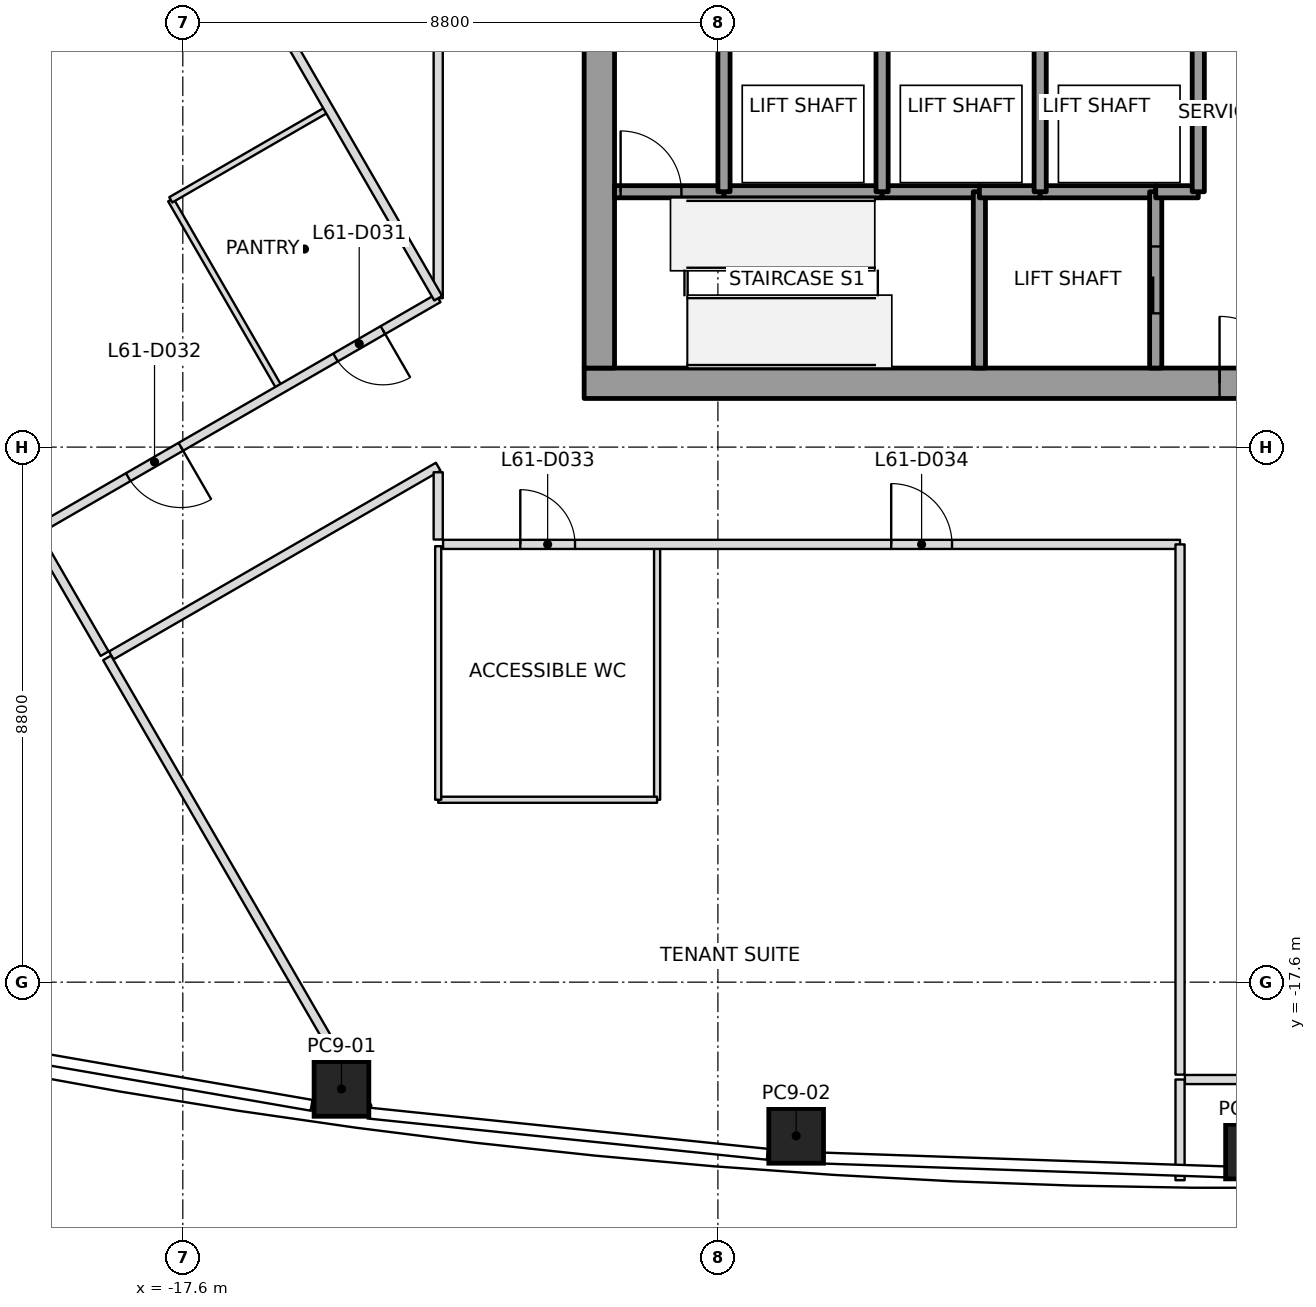
"""IFC4 building model, lengths in metres.
Left out: names, types, materials, properties, quantities, classifications, styles, units other than length and angle.
Written with IfcOpenShell. Run it as: python <this file> out.ifc"""

import sys

from ifc_helpers import new_model, si_unit, direction, frame, frame_2d, origin, origin_2d, place, context, subcontext, project, spatial, rectangle, extrude, element, fill, save


model = new_model("IFC4")
c1 = context("Model", 3, precision=1e-05, world=origin(), true_north=direction((0.0, 1.0)))
c2 = subcontext(c1, "Body", "Model", "MODEL_VIEW")
j1 = project(units=[si_unit("LENGTHUNIT", "METRE"), si_unit("PLANEANGLEUNIT", "RADIAN")], contexts=[c1])
p1 = place(None, origin())
s1 = spatial("IfcSite", under=j1, at=p1, CompositionType="ELEMENT")
p2 = place(p1, origin())
s2 = spatial("IfcBuilding", under=s1, at=p2, CompositionType="ELEMENT")
p3 = place(p2, frame((0.0, 0.0, 271.0)))
s3 = spatial("IfcBuildingStorey", under=s2, at=p3, CompositionType="ELEMENT", Elevation=271.0)
p4 = place(p3, frame((-14.991, -19.356, 0.0), z_axis=(0.017452445502, 0.010434853779, 0.999793241612), x_axis=(-0.990449528145, 0.136960564895, 0.015859882108)))
e1 = element("IfcColumn", 1, at=p4, inside=s3, PredefinedType="COLUMN", context=c2, shape_type="SweptSolid", body=[
    extrude(rectangle(XDim=0.9, YDim=0.9, at=origin_2d()), origin(), (0.0, 0.0, 1.0), 4.001),
])
p5 = place(p3, frame((-7.513, -20.128, 0.0), z_axis=(0.008727150594, 0.011168311599, 0.999899547784), x_axis=(-0.997609340285, 0.068648045821, 0.007940401811)))
e2 = element("IfcColumn", 2, at=p5, inside=s3, PredefinedType="COLUMN", context=c2, shape_type="SweptSolid", body=[
    extrude(rectangle(XDim=0.9, YDim=0.9, at=origin_2d()), origin(), (0.0, 0.0, 1.0), 4.0),
])
p6 = place(p3, frame((0.0, -20.386, 0.0), z_axis=(0.0, 0.01141283087, 0.999934871525), x_axis=(1.0, 0.0, 0.0)))
e3 = element("IfcColumn", 3, at=p6, inside=s3, PredefinedType="COLUMN", context=c2, shape_type="SweptSolid", body=[
    extrude(rectangle(XDim=0.9, YDim=0.9, at=origin_2d()), origin(), (0.0, 0.0, 1.0), 4.0),
])
p7 = place(p3, frame((-11.0, -7.75, 0.0), z_axis=(0.0, 0.0, 1.0), x_axis=(1.0, 0.0, 0.0)))
e4 = element("IfcWall", 4, at=p7, inside=s3, PredefinedType="SHEAR", context=c2, shape_type="SweptSolid", body=[
    extrude(rectangle(XDim=22.0, YDim=0.5, at=frame_2d((11.0, 0.0))), origin(), (0.0, 0.0, 1.0), 4.0),
])
p8 = place(p7, frame((10.45, 0.0, 0.0)))
e5 = element("IfcOpeningElement", 5, at=p8, cuts=e4, PredefinedType="OPENING", context=c2, shape_type="SweptSolid", body=[
    extrude(rectangle(XDim=1.1, YDim=2.1, at=frame_2d((0.55, 1.05))), frame((0.0, 0.25, 0.0), z_axis=(0.0, -1.0, 0.0), x_axis=(1.0, 0.0, 0.0)), (0.0, 0.0, 1.0), 0.5),
])
p9 = place(p3, frame((-10.75, -7.5, 0.0), z_axis=(0.0, 0.0, 1.0), x_axis=(0.0, 1.0, 0.0)))
e6 = element("IfcWall", 6, at=p9, inside=s3, PredefinedType="SHEAR", context=c2, shape_type="SweptSolid", body=[
    extrude(rectangle(XDim=15.0, YDim=0.5, at=frame_2d((7.5, 0.0))), origin(), (0.0, 0.0, 1.0), 4.0),
])
p10 = place(p9, frame((6.6, 0.0, 0.0)))
e7 = element("IfcOpeningElement", 7, at=p10, cuts=e6, PredefinedType="OPENING", context=c2, shape_type="SweptSolid", body=[
    extrude(rectangle(XDim=1.8, YDim=2.1, at=frame_2d((0.9, 1.05))), frame((0.0, 0.25, 0.0), z_axis=(0.0, -1.0, 0.0), x_axis=(1.0, 0.0, 0.0)), (0.0, 0.0, 1.0), 0.5),
])
p11 = place(p3, frame((-10.5, -4.6, 0.0), z_axis=(0.0, 0.0, 1.0), x_axis=(1.0, 0.0, 0.0)))
e8 = element("IfcWall", 8, at=p11, inside=s3, PredefinedType="SOLIDWALL", context=c2, shape_type="SweptSolid", body=[
    extrude(rectangle(XDim=1.8, YDim=0.2, at=frame_2d((0.9, 0.0))), origin(), (0.0, 0.0, 1.0), 3.85),
])
p12 = place(p11, frame((0.1, 0.0, 0.0)))
e9 = element("IfcOpeningElement", 9, at=p12, cuts=e8, PredefinedType="OPENING", context=c2, shape_type="SweptSolid", body=[
    extrude(rectangle(XDim=1.0, YDim=2.1, at=frame_2d((0.5, 1.05))), frame((0.0, 0.1, 0.0), z_axis=(0.0, -1.0, 0.0), x_axis=(1.0, 0.0, 0.0)), (0.0, 0.0, 1.0), 0.2),
])
p13 = place(p3, frame((-8.7, -4.6, 0.0), z_axis=(0.0, 0.0, 1.0), x_axis=(1.0, 0.0, 0.0)))
e10 = element("IfcWall", 10, at=p13, inside=s3, PredefinedType="SOLIDWALL", context=c2, shape_type="SweptSolid", body=[
    extrude(rectangle(XDim=2.6, YDim=0.2, at=frame_2d((1.3, 0.0))), origin(), (0.0, 0.0, 1.0), 3.85),
])
p14 = place(p3, frame((-8.7, -4.6, 0.0), z_axis=(0.0, 0.0, 1.0), x_axis=(0.0, 1.0, 0.0)))
e11 = element("IfcWall", 11, at=p14, inside=s3, PredefinedType="SOLIDWALL", context=c2, shape_type="SweptSolid", body=[
    extrude(rectangle(XDim=2.8, YDim=0.2, at=frame_2d((1.4, 0.0))), origin(), (0.0, 0.0, 1.0), 3.85),
])
p15 = place(p3, frame((-6.1, -4.6, 0.0), z_axis=(0.0, 0.0, 1.0), x_axis=(1.0, 0.0, 0.0)))
e12 = element("IfcWall", 12, at=p15, inside=s3, PredefinedType="SOLIDWALL", context=c2, shape_type="SweptSolid", body=[
    extrude(rectangle(XDim=1.6, YDim=0.2, at=frame_2d((0.8, 0.0))), origin(), (0.0, 0.0, 1.0), 3.85),
])
p16 = place(p3, frame((-6.1, -4.6, 0.0), z_axis=(0.0, 0.0, 1.0), x_axis=(0.0, 1.0, 0.0)))
e13 = element("IfcWall", 13, at=p16, inside=s3, PredefinedType="SOLIDWALL", context=c2, shape_type="SweptSolid", body=[
    extrude(rectangle(XDim=2.8, YDim=0.2, at=frame_2d((1.4, 0.0))), origin(), (0.0, 0.0, 1.0), 3.85),
])
p17 = place(p3, frame((-4.5, -4.6, 0.0), z_axis=(0.0, 0.0, 1.0), x_axis=(0.0, -1.0, 0.0)))
e14 = element("IfcWall", 14, at=p17, inside=s3, PredefinedType="SOLIDWALL", context=c2, shape_type="SweptSolid", body=[
    extrude(rectangle(XDim=2.9, YDim=0.2, at=frame_2d((1.45, 0.0))), origin(), (0.0, 0.0, 1.0), 3.85),
])
p18 = place(p3, frame((-4.5, -4.6, 0.0), z_axis=(0.0, 0.0, 1.0), x_axis=(1.0, 0.0, 0.0)))
e15 = element("IfcWall", 15, at=p18, inside=s3, PredefinedType="SOLIDWALL", context=c2, shape_type="SweptSolid", body=[
    extrude(rectangle(XDim=1.0, YDim=0.2, at=frame_2d((0.5, 0.0))), origin(), (0.0, 0.0, 1.0), 3.85),
])
p19 = place(p3, frame((-3.5, -4.6, 0.0), z_axis=(0.0, 0.0, 1.0), x_axis=(1.0, 0.0, 0.0)))
e16 = element("IfcWall", 16, at=p19, inside=s3, PredefinedType="SOLIDWALL", context=c2, shape_type="SweptSolid", body=[
    extrude(rectangle(XDim=1.9, YDim=0.2, at=frame_2d((0.95, 0.0))), origin(), (0.0, 0.0, 1.0), 3.85),
])
p20 = place(p3, frame((-3.5, -4.6, 0.0), z_axis=(0.0, 0.0, 1.0), x_axis=(0.0, 1.0, 0.0)))
e17 = element("IfcWall", 17, at=p20, inside=s3, PredefinedType="SOLIDWALL", context=c2, shape_type="SweptSolid", body=[
    extrude(rectangle(XDim=2.8, YDim=0.2, at=frame_2d((1.4, 0.0))), origin(), (0.0, 0.0, 1.0), 3.85),
])
p21 = place(p3, frame((-1.6, -7.5, 0.0), z_axis=(0.0, 0.0, 1.0), x_axis=(0.0, 1.0, 0.0)))
e18 = element("IfcWall", 18, at=p21, inside=s3, PredefinedType="SOLIDWALL", context=c2, shape_type="SweptSolid", body=[
    extrude(rectangle(XDim=2.9, YDim=0.2, at=frame_2d((1.45, 0.0))), origin(), (0.0, 0.0, 1.0), 3.85),
])
p22 = place(p21, frame((0.9, 0.0, 0.0)))
e19 = element("IfcOpeningElement", 19, at=p22, cuts=e18, PredefinedType="OPENING", context=c2, shape_type="SweptSolid", body=[
    extrude(rectangle(XDim=1.1, YDim=2.1, at=frame_2d((0.55, 1.05))), frame((0.0, 0.1, 0.0), z_axis=(0.0, -1.0, 0.0), x_axis=(1.0, 0.0, 0.0)), (0.0, 0.0, 1.0), 0.2),
])
p23 = place(p3, frame((-1.6, -4.6, 0.0), z_axis=(0.0, 0.0, 1.0), x_axis=(1.0, 0.0, 0.0)))
e20 = element("IfcWall", 20, at=p23, inside=s3, PredefinedType="SOLIDWALL", context=c2, shape_type="SweptSolid", body=[
    extrude(rectangle(XDim=0.7, YDim=0.2, at=frame_2d((0.35, 0.0))), origin(), (0.0, 0.0, 1.0), 3.85),
])
p24 = place(p3, frame((-0.9, -4.6, 0.0), z_axis=(0.0, 0.0, 1.0), x_axis=(0.0, 1.0, 0.0)))
e21 = element("IfcWall", 21, at=p24, inside=s3, PredefinedType="SOLIDWALL", context=c2, shape_type="SweptSolid", body=[
    extrude(rectangle(XDim=2.8, YDim=0.2, at=frame_2d((1.4, 0.0))), origin(), (0.0, 0.0, 1.0), 3.85),
])
p25 = place(p3, frame((-13.4, -6.351, 0.0), z_axis=(0.0, 0.0, 1.0), x_axis=(-0.500014181681, 0.866017215832, 0.0)))
e22 = element("IfcWall", 22, at=p25, inside=s3, PredefinedType="PARTITIONING", context=c2, shape_type="SweptSolid", body=[
    extrude(rectangle(XDim=14.223, YDim=0.15, at=frame_2d((7.111, 0.0))), origin(), (0.0, 0.0, 1.0), 3.234),
])
p26 = place(p3, frame((-18.846, -12.266, 0.0), z_axis=(0.0, 0.0, 1.0), x_axis=(0.500745947158, -0.865594302433, 0.0)))
e23 = element("IfcWall", 23, at=p26, inside=s3, PredefinedType="PARTITIONING", context=c2, shape_type="SweptSolid", body=[
    extrude(rectangle(XDim=8.553, YDim=0.15, at=frame_2d((4.277, 0.0))), origin(), (0.0, 0.0, 1.0), 3.3),
])
p27 = place(p3, frame((-1.2, -19.201, 0.0), z_axis=(0.0, 0.0, 1.0), x_axis=(0.0, -1.0, 0.0)))
e24 = element("IfcWall", 24, at=p27, inside=s3, PredefinedType="PARTITIONING", context=c2, shape_type="SweptSolid", body=[
    extrude(rectangle(XDim=1.656, YDim=0.15, at=frame_2d((0.828, 0.0))), origin(), (0.0, 0.0, 1.0), 3.234),
])
p28 = place(p3, frame((-20.006, -10.257, 0.0), z_axis=(0.0, 0.0, 1.0), x_axis=(0.500030632641, -0.866007717299, 0.0)))
e25 = element("IfcWall", 25, at=p28, inside=s3, PredefinedType="PARTITIONING", context=c2, shape_type="SweptSolid", body=[
    extrude(rectangle(XDim=2.24, YDim=0.15, at=frame_2d((1.12, 0.0))), origin(), (0.0, 0.0, 1.0), 3.233),
])
p29 = place(p3, frame((-13.4, -6.351, 0.0), z_axis=(0.0, 0.0, 1.0), x_axis=(-0.866034613097, -0.499984048663, 0.0)))
e26 = element("IfcWall", 26, at=p29, inside=s3, PredefinedType="PARTITIONING", context=c2, shape_type="SweptSolid", body=[
    extrude(rectangle(XDim=7.594, YDim=0.15, at=frame_2d((3.797, 0.0))), origin(), (0.0, 0.0, 1.0), 3.3),
])
p30 = place(p29, frame((1.05, 0.0, 0.0)))
e27 = element("IfcOpeningElement", 27, at=p30, cuts=e26, PredefinedType="OPENING", context=c2, shape_type="SweptSolid", body=[
    extrude(rectangle(XDim=0.9, YDim=2.1, at=frame_2d((0.45, 1.05))), frame((0.0, 0.075, 0.0), z_axis=(0.0, -1.0, 0.0), x_axis=(1.0, 0.0, 0.0)), (0.0, 0.0, 1.0), 0.15),
])
p31 = place(p29, frame((4.887, 0.0, 0.0)))
e28 = element("IfcOpeningElement", 28, at=p31, cuts=e26, PredefinedType="OPENING", context=c2, shape_type="SweptSolid", body=[
    extrude(rectangle(XDim=1.0, YDim=2.1, at=frame_2d((0.5, 1.05))), frame((0.0, 0.075, 0.0), z_axis=(0.0, -1.0, 0.0), x_axis=(1.0, 0.0, 0.0)), (0.0, 0.0, 1.0), 0.15),
])
p32 = place(p3, frame((-18.777, -12.226, 0.0), z_axis=(0.0, 0.0, 1.0), x_axis=(0.866025148001, 0.500000443029, 0.0)))
e29 = element("IfcWall", 29, at=p32, inside=s3, PredefinedType="PARTITIONING", context=c2, shape_type="SweptSolid", body=[
    extrude(rectangle(XDim=6.208, YDim=0.15, at=frame_2d((3.104, 0.0))), origin(), (0.0, 0.0, 1.0), 3.233),
])
p33 = place(p3, frame((-13.4, -9.214, 0.0), z_axis=(0.0, 0.0, 1.0), x_axis=(0.0, -1.0, 0.0)))
e30 = element("IfcWall", 30, at=p33, inside=s3, PredefinedType="PARTITIONING", context=c2, shape_type="SweptSolid", body=[
    extrude(rectangle(XDim=1.106, YDim=0.15, at=frame_2d((0.553, 0.0))), origin(), (0.0, 0.0, 1.0), 3.233),
])
p34 = place(p3, frame((-13.4, 6.351, 0.0), z_axis=(0.0, 0.0, 1.0), x_axis=(0.0, -1.0, 0.0)))
e31 = element("IfcWall", 31, at=p34, inside=s3, PredefinedType="PARTITIONING", context=c2, shape_type="SweptSolid", body=[
    extrude(rectangle(XDim=12.702, YDim=0.15, at=frame_2d((6.351, 0.0))), origin(), (0.0, 0.0, 1.0), 3.3),
])
p35 = place(p34, frame((5.851, 0.0, 0.0)))
e32 = element("IfcOpeningElement", 32, at=p35, cuts=e31, PredefinedType="OPENING", context=c2, shape_type="SweptSolid", body=[
    extrude(rectangle(XDim=1.0, YDim=2.1, at=frame_2d((0.5, 1.05))), frame((0.0, 0.075, 0.0), z_axis=(0.0, -1.0, 0.0), x_axis=(1.0, 0.0, 0.0)), (0.0, 0.0, 1.0), 0.15),
])
p36 = place(p3, frame((-13.32, -10.4, 0.0), z_axis=(0.0, 0.0, 1.0), x_axis=(1.0, 0.0, 0.0)))
e33 = element("IfcWall", 33, at=p36, inside=s3, PredefinedType="PARTITIONING", context=c2, shape_type="SweptSolid", body=[
    extrude(rectangle(XDim=12.12, YDim=0.15, at=frame_2d((6.06, 0.0))), origin(), (0.0, 0.0, 1.0), 3.3),
])
p37 = place(p36, frame((1.27, 0.0, 0.0)))
e34 = element("IfcOpeningElement", 34, at=p37, cuts=e33, PredefinedType="OPENING", context=c2, shape_type="SweptSolid", body=[
    extrude(rectangle(XDim=0.9, YDim=2.1, at=frame_2d((0.45, 1.05))), frame((0.0, 0.075, 0.0), z_axis=(0.0, -1.0, 0.0), x_axis=(1.0, 0.0, 0.0)), (0.0, 0.0, 1.0), 0.15),
])
p38 = place(p36, frame((7.37, 0.0, 0.0)))
e35 = element("IfcOpeningElement", 35, at=p38, cuts=e33, PredefinedType="OPENING", context=c2, shape_type="SweptSolid", body=[
    extrude(rectangle(XDim=1.0, YDim=2.1, at=frame_2d((0.5, 1.05))), frame((0.0, 0.075, 0.0), z_axis=(0.0, -1.0, 0.0), x_axis=(1.0, 0.0, 0.0)), (0.0, 0.0, 1.0), 0.15),
])
p39 = place(p3, frame((-1.2, -10.4, 0.0), z_axis=(0.0, 0.0, 1.0), x_axis=(0.0, -1.0, 0.0)))
e36 = element("IfcWall", 36, at=p39, inside=s3, PredefinedType="PARTITIONING", context=c2, shape_type="SweptSolid", body=[
    extrude(rectangle(XDim=8.721, YDim=0.15, at=frame_2d((4.361, 0.0))), origin(), (0.0, 0.0, 1.0), 3.3),
])
p40 = place(p3, frame((-1.12, -19.201, 0.0), z_axis=(0.0, 0.0, 1.0), x_axis=(1.0, 0.0, 0.0)))
e37 = element("IfcWall", 37, at=p40, inside=s3, PredefinedType="PARTITIONING", context=c2, shape_type="SweptSolid", body=[
    extrude(rectangle(XDim=2.24, YDim=0.15, at=frame_2d((1.12, 0.0))), origin(), (0.0, 0.0, 1.0), 3.3),
])
p41 = place(p3, frame((-16.013, -7.825, 0.0), z_axis=(0.0, 0.0, 1.0), x_axis=(-0.499971082179, 0.866042098853, 0.0)))
e38 = element("IfcWall", 38, at=p41, inside=s3, PredefinedType="PARTITIONING", context=c2, shape_type="SweptSolid", body=[
    extrude(rectangle(XDim=3.57, YDim=0.1, at=frame_2d((1.785, 0.0))), origin(), (0.0, 0.0, 1.0), 3.3),
])
p42 = place(p3, frame((-17.798, -4.733, 0.0), z_axis=(0.0, 0.0, 1.0), x_axis=(0.866039111053, 0.499976257563, 0.0)))
e39 = element("IfcWall", 39, at=p42, inside=s3, PredefinedType="PARTITIONING", context=c2, shape_type="SweptSolid", body=[
    extrude(rectangle(XDim=2.97, YDim=0.1, at=frame_2d((1.485, 0.0))), origin(), (0.0, 0.0, 1.0), 3.3),
])
p43 = place(p3, frame((-9.8, -10.43, 0.0), z_axis=(0.0, 0.0, 1.0), x_axis=(0.0, -1.0, 0.0)))
e40 = element("IfcWall", 40, at=p43, inside=s3, PredefinedType="PARTITIONING", context=c2, shape_type="SweptSolid", body=[
    extrude(rectangle(XDim=4.17, YDim=0.1, at=frame_2d((2.085, 0.0))), origin(), (0.0, 0.0, 1.0), 3.3),
])
p44 = place(p3, frame((-9.8, -14.6, 0.0), z_axis=(0.0, 0.0, 1.0), x_axis=(-1.0, 0.0, 0.0)))
e41 = element("IfcWall", 41, at=p44, inside=s3, PredefinedType="PARTITIONING", context=c2, shape_type="SweptSolid", body=[
    extrude(rectangle(XDim=3.6, YDim=0.1, at=frame_2d((1.8, 0.0))), origin(), (0.0, 0.0, 1.0), 3.3),
])
p45 = place(p3, frame((-13.4, -14.6, 0.0), z_axis=(0.0, 0.0, 1.0), x_axis=(0.0, 1.0, 0.0)))
e42 = element("IfcWall", 42, at=p45, inside=s3, PredefinedType="PARTITIONING", context=c2, shape_type="SweptSolid", body=[
    extrude(rectangle(XDim=4.17, YDim=0.1, at=frame_2d((2.085, 0.0))), origin(), (0.0, 0.0, 1.0), 3.3),
])
p46 = place(p30, origin())
e43 = element("IfcDoor", 43, at=p46, inside=s3, OperationType="SINGLE_SWING_RIGHT", PredefinedType="DOOR", context=c2, shape_type="SweptSolid", body=[
    extrude(rectangle(XDim=0.9, YDim=2.1, at=frame_2d((0.45, 1.05))), frame((0.0, 0.025, 0.0), z_axis=(0.0, -1.0, 0.0), x_axis=(1.0, 0.0, 0.0)), (0.0, 0.0, 1.0), 0.05),
])
fill(e27, e43)
p47 = place(p31, origin())
e44 = element("IfcDoor", 44, at=p47, inside=s3, OperationType="SINGLE_SWING_LEFT", PredefinedType="DOOR", context=c2, shape_type="SweptSolid", body=[
    extrude(rectangle(XDim=1.0, YDim=2.1, at=frame_2d((0.5, 1.05))), frame((0.0, 0.025, 0.0), z_axis=(0.0, -1.0, 0.0), x_axis=(1.0, 0.0, 0.0)), (0.0, 0.0, 1.0), 0.05),
])
fill(e28, e44)
p48 = place(p37, origin())
e45 = element("IfcDoor", 45, at=p48, inside=s3, OperationType="SINGLE_SWING_LEFT", PredefinedType="DOOR", context=c2, shape_type="SweptSolid", body=[
    extrude(rectangle(XDim=0.9, YDim=2.1, at=frame_2d((0.45, 1.05))), frame((0.0, 0.025, 0.0), z_axis=(0.0, -1.0, 0.0), x_axis=(1.0, 0.0, 0.0)), (0.0, 0.0, 1.0), 0.05),
])
fill(e34, e45)
p49 = place(p38, origin())
e46 = element("IfcDoor", 46, at=p49, inside=s3, OperationType="SINGLE_SWING_RIGHT", PredefinedType="DOOR", context=c2, shape_type="SweptSolid", body=[
    extrude(rectangle(XDim=1.0, YDim=2.1, at=frame_2d((0.5, 1.05))), frame((0.0, 0.025, 0.0), z_axis=(0.0, -1.0, 0.0), x_axis=(1.0, 0.0, 0.0)), (0.0, 0.0, 1.0), 0.05),
])
fill(e35, e46)
p50 = place(p22, origin())
e47 = element("IfcDoor", 47, at=p50, inside=s3, OperationType="SLIDING_TO_LEFT", PredefinedType="DOOR", context=c2, shape_type="SweptSolid", body=[
    extrude(rectangle(XDim=1.1, YDim=2.1, at=frame_2d((0.55, 1.05))), frame((0.0, 0.025, 0.0), z_axis=(0.0, -1.0, 0.0), x_axis=(1.0, 0.0, 0.0)), (0.0, 0.0, 1.0), 0.05),
])
fill(e19, e47)
p51 = place(p12, origin())
e48 = element("IfcDoor", 48, at=p51, inside=s3, OperationType="SINGLE_SWING_LEFT", PredefinedType="DOOR", context=c2, shape_type="SweptSolid", body=[
    extrude(rectangle(XDim=1.0, YDim=2.1, at=frame_2d((0.5, 1.05))), frame((0.0, 0.025, 0.0), z_axis=(0.0, -1.0, 0.0), x_axis=(1.0, 0.0, 0.0)), (0.0, 0.0, 1.0), 0.05),
])
fill(e9, e48)
p52 = place(p8, origin())
e49 = element("IfcDoor", 49, at=p52, inside=s3, OperationType="SINGLE_SWING_LEFT", PredefinedType="DOOR", context=c2, shape_type="SweptSolid", body=[
    extrude(rectangle(XDim=1.1, YDim=2.1, at=frame_2d((0.55, 1.05))), frame((0.0, 0.025, 0.0), z_axis=(0.0, -1.0, 0.0), x_axis=(1.0, 0.0, 0.0)), (0.0, 0.0, 1.0), 0.05),
])
fill(e5, e49)
save(model, sys.argv[1])
